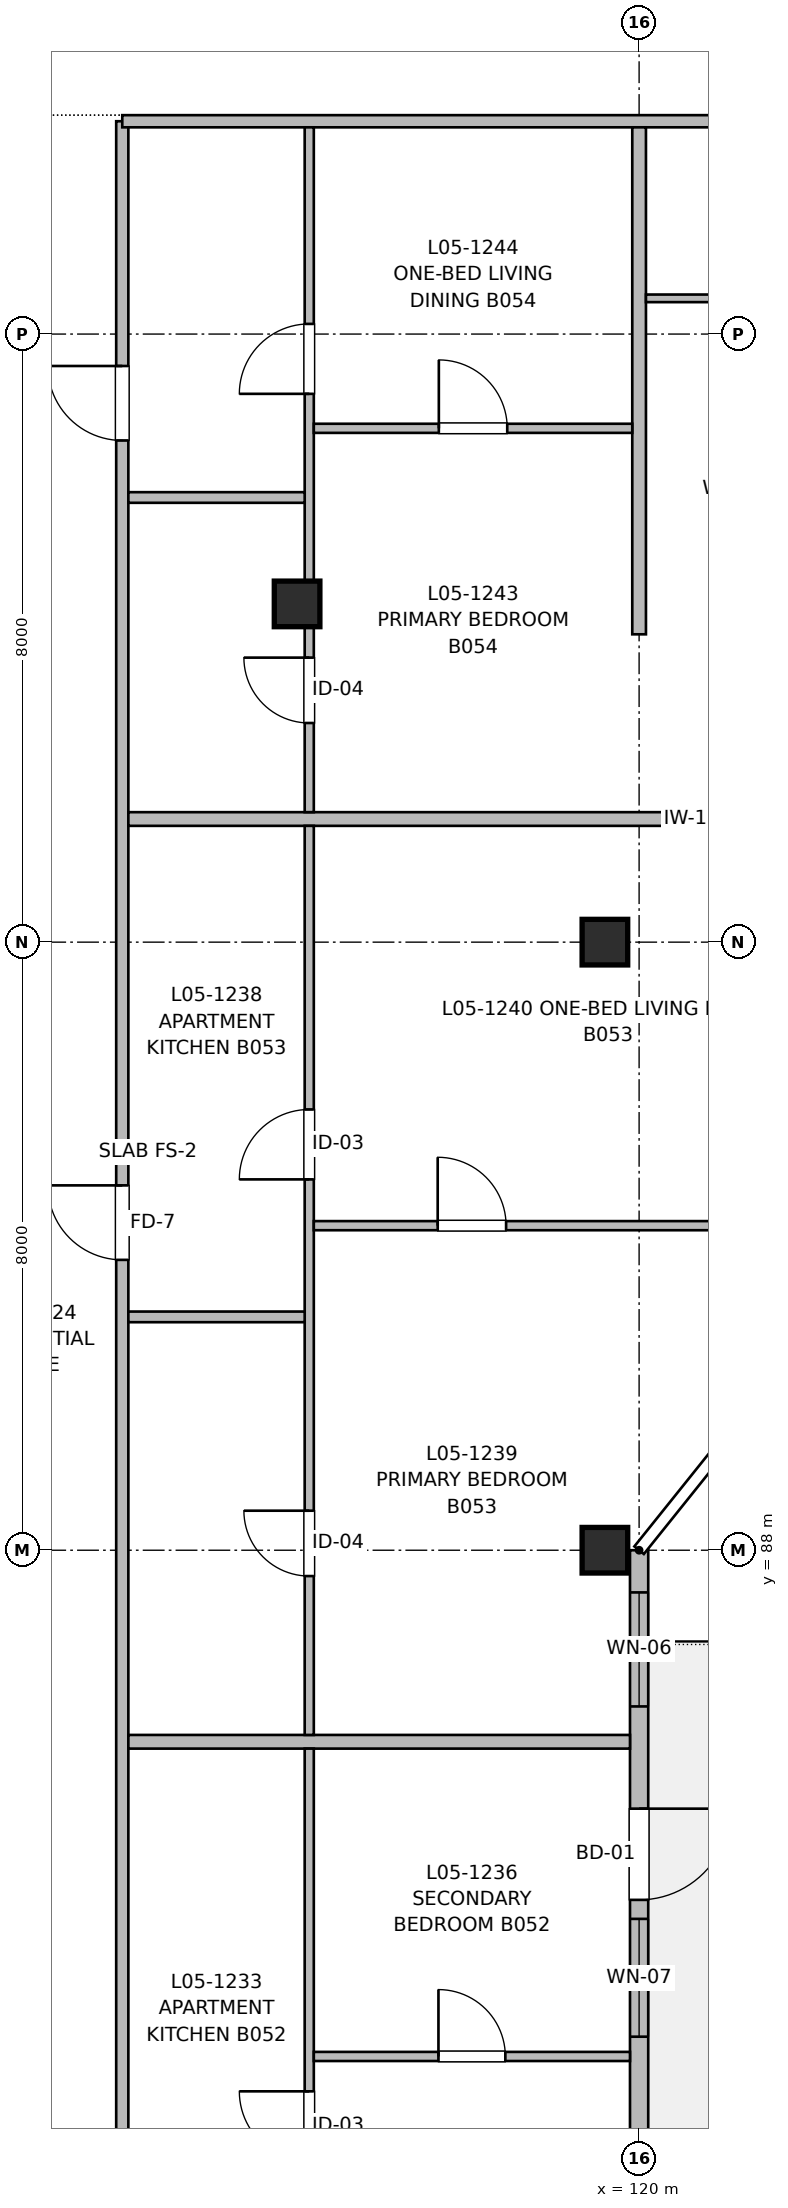
"""IFC4 building model, lengths in metres.
Left out: names, types, materials, properties, quantities, classifications, styles, units other than length and angle.
Written with IfcOpenShell. Run it as: python <this file> out.ifc"""

import sys

from ifc_helpers import new_model, si_unit, direction, frame, frame_2d, origin, origin_2d, place, context, subcontext, project, spatial, rectangle, extrude, element, fill, save


model = new_model("IFC4")
c1 = context("Model", 3, precision=1e-05, world=origin(), true_north=direction((0.0, 1.0)))
c2 = subcontext(c1, "Body", "Model", "MODEL_VIEW")
j1 = project(units=[si_unit("LENGTHUNIT", "METRE"), si_unit("PLANEANGLEUNIT", "RADIAN")], contexts=[c1])
p1 = place(None, origin())
s1 = spatial("IfcSite", under=j1, at=p1, CompositionType="ELEMENT")
p2 = place(p1, origin())
s2 = spatial("IfcBuilding", under=s1, at=p2, CompositionType="ELEMENT")
p3 = place(p2, frame((0.0, 0.0, 16.96)))
s3 = spatial("IfcBuildingStorey", under=s2, at=p3, CompositionType="ELEMENT", Elevation=16.96)
for number, where, z_axis, x_axis in (
    (1, (115.5, 100.45, 0.0), (0.0, 0.0, 1.0), (1.0, 0.0, 0.0)),
    (2, (119.55, 88.0, 0.0), (0.0, 0.0, 1.0), (1.0, 0.0, 0.0)),
    (3, (119.55, 96.0, 0.0), (0.0, 0.0, 1.0), (1.0, 0.0, 0.0)),
):
    element("IfcColumn", number, at=place(p3, frame(where, z_axis=z_axis, x_axis=x_axis)), inside=s3, PredefinedType="COLUMN", context=c2, shape_type="SweptSolid", body=[
        extrude(rectangle(XDim=0.6, YDim=0.6, at=origin_2d()), origin(), (0.0, 0.0, 1.0), 3.2),
    ])
p4 = place(p3, frame((120.0, 88.0, 0.0), z_axis=(0.0, 0.0, 1.0), x_axis=(0.0, -1.0, 0.0)))
e4 = element("IfcWall", 4, at=p4, inside=s3, PredefinedType="SOLIDWALL", context=c2, shape_type="SweptSolid", body=[
    extrude(rectangle(XDim=32.0, YDim=0.24, at=frame_2d((16.0, 0.0))), origin(), (0.0, 0.0, 1.0), 2.98),
])
p5 = place(p4, frame((3.4, 0.0, 0.0)))
e5 = element("IfcOpeningElement", 5, at=p5, cuts=e4, PredefinedType="OPENING", context=c2, shape_type="SweptSolid", body=[
    extrude(rectangle(XDim=1.2, YDim=2.2, at=frame_2d((0.6, 1.1))), frame((0.0, 0.13, 0.0), z_axis=(0.0, -1.0, 0.0), x_axis=(1.0, 0.0, 0.0)), (0.0, 0.0, 1.0), 0.26),
])
p6 = place(p4, frame((4.85, 0.0, 0.82)))
e6 = element("IfcOpeningElement", 6, at=p6, cuts=e4, PredefinedType="OPENING", context=c2, shape_type="SweptSolid", body=[
    extrude(rectangle(XDim=1.55, YDim=1.4, at=frame_2d((0.775, 0.7))), frame((0.0, 0.13, 0.0), z_axis=(0.0, -1.0, 0.0), x_axis=(1.0, 0.0, 0.0)), (0.0, 0.0, 1.0), 0.26),
])
p7 = place(p4, frame((9.4, 0.0, 0.67)))
e7 = element("IfcOpeningElement", 7, at=p7, cuts=e4, PredefinedType="OPENING", context=c2, shape_type="SweptSolid", body=[
    extrude(rectangle(XDim=2.6, YDim=1.55, at=frame_2d((1.3, 0.775))), frame((0.0, 0.13, 0.0), z_axis=(0.0, -1.0, 0.0), x_axis=(1.0, 0.0, 0.0)), (0.0, 0.0, 1.0), 0.26),
])
p8 = place(p4, frame((19.16, 0.0, 0.72)))
e8 = element("IfcOpeningElement", 8, at=p8, cuts=e4, PredefinedType="OPENING", context=c2, shape_type="SweptSolid", body=[
    extrude(rectangle(XDim=1.68, YDim=1.5, at=frame_2d((0.84, 0.75))), frame((0.0, 0.13, 0.0), z_axis=(0.0, -1.0, 0.0), x_axis=(1.0, 0.0, 0.0)), (0.0, 0.0, 1.0), 0.26),
])
p9 = place(p4, frame((27.55, 0.0, 0.72)))
e9 = element("IfcOpeningElement", 9, at=p9, cuts=e4, PredefinedType="OPENING", context=c2, shape_type="SweptSolid", body=[
    extrude(rectangle(XDim=1.8, YDim=1.5, at=frame_2d((0.9, 0.75))), frame((0.0, 0.13, 0.0), z_axis=(0.0, -1.0, 0.0), x_axis=(1.0, 0.0, 0.0)), (0.0, 0.0, 1.0), 0.26),
])
p10 = place(p4, frame((24.425, 0.0, 0.82)))
e10 = element("IfcOpeningElement", 10, at=p10, cuts=e4, PredefinedType="OPENING", context=c2, shape_type="SweptSolid", body=[
    extrude(rectangle(XDim=1.5, YDim=1.4, at=frame_2d((0.75, 0.7))), frame((0.0, 0.13, 0.0), z_axis=(0.0, -1.0, 0.0), x_axis=(1.0, 0.0, 0.0)), (0.0, 0.0, 1.0), 0.26),
])
p11 = place(p4, frame((13.69, 0.0, 0.82)))
e11 = element("IfcOpeningElement", 11, at=p11, cuts=e4, PredefinedType="OPENING", context=c2, shape_type="SweptSolid", body=[
    extrude(rectangle(XDim=1.5, YDim=1.4, at=frame_2d((0.75, 0.7))), frame((0.0, 0.13, 0.0), z_axis=(0.0, -1.0, 0.0), x_axis=(1.0, 0.0, 0.0)), (0.0, 0.0, 1.0), 0.26),
])
p12 = place(p4, frame((0.555, 0.0, 0.82)))
e12 = element("IfcOpeningElement", 12, at=p12, cuts=e4, PredefinedType="OPENING", context=c2, shape_type="SweptSolid", body=[
    extrude(rectangle(XDim=1.5, YDim=1.4, at=frame_2d((0.75, 0.7))), frame((0.0, 0.13, 0.0), z_axis=(0.0, -1.0, 0.0), x_axis=(1.0, 0.0, 0.0)), (0.0, 0.0, 1.0), 0.26),
])
p13 = place(p3, frame((113.2, 56.16, 0.0), z_axis=(0.0, 0.0, 1.0), x_axis=(0.0, 1.0, 0.0)))
e13 = element("IfcWall", 13, at=p13, inside=s3, PredefinedType="PARTITIONING", context=c2, shape_type="SweptSolid", body=[
    extrude(rectangle(XDim=50.64, YDim=0.16, at=frame_2d((25.32, 0.0))), origin(), (0.0, 0.0, 1.0), 2.935),
])
p14 = place(p13, frame((7.69, 0.0, 0.0)))
e14 = element("IfcOpeningElement", 14, at=p14, cuts=e13, PredefinedType="OPENING", context=c2, shape_type="SweptSolid", body=[
    extrude(rectangle(XDim=0.98, YDim=2.15, at=frame_2d((0.49, 1.075))), frame((0.0, 0.09, 0.0), z_axis=(0.0, -1.0, 0.0), x_axis=(1.0, 0.0, 0.0)), (0.0, 0.0, 1.0), 0.18),
])
p15 = place(p13, frame((22.44, 0.0, 0.0)))
e15 = element("IfcOpeningElement", 15, at=p15, cuts=e13, PredefinedType="OPENING", context=c2, shape_type="SweptSolid", body=[
    extrude(rectangle(XDim=1.02, YDim=2.15, at=frame_2d((0.51, 1.075))), frame((0.0, 0.09, 0.0), z_axis=(0.0, -1.0, 0.0), x_axis=(1.0, 0.0, 0.0)), (0.0, 0.0, 1.0), 0.18),
])
p16 = place(p13, frame((35.66, 0.0, 0.0)))
e16 = element("IfcOpeningElement", 16, at=p16, cuts=e13, PredefinedType="OPENING", context=c2, shape_type="SweptSolid", body=[
    extrude(rectangle(XDim=0.98, YDim=2.15, at=frame_2d((0.49, 1.075))), frame((0.0, 0.09, 0.0), z_axis=(0.0, -1.0, 0.0), x_axis=(1.0, 0.0, 0.0)), (0.0, 0.0, 1.0), 0.18),
])
p17 = place(p13, frame((46.44, 0.0, 0.0)))
e17 = element("IfcOpeningElement", 17, at=p17, cuts=e13, PredefinedType="OPENING", context=c2, shape_type="SweptSolid", body=[
    extrude(rectangle(XDim=0.98, YDim=2.15, at=frame_2d((0.49, 1.075))), frame((0.0, 0.09, 0.0), z_axis=(0.0, -1.0, 0.0), x_axis=(1.0, 0.0, 0.0)), (0.0, 0.0, 1.0), 0.18),
])
p18 = place(p3, frame((113.2, 106.8, 0.0), z_axis=(0.0, 0.0, 1.0), x_axis=(1.0, 0.0, 0.0)))
e18 = element("IfcWall", 18, at=p18, inside=s3, PredefinedType="PARTITIONING", context=c2, shape_type="SweptSolid", body=[
    extrude(rectangle(XDim=24.14, YDim=0.16, at=frame_2d((12.07, 0.0))), origin(), (0.0, 0.0, 1.0), 2.935),
])
p19 = place(p18, frame((19.575, 0.0, 0.0)))
e19 = element("IfcOpeningElement", 19, at=p19, cuts=e18, PredefinedType="OPENING", context=c2, shape_type="SweptSolid", body=[
    extrude(rectangle(XDim=1.05, YDim=2.15, at=frame_2d((0.525, 1.075))), frame((0.0, 0.09, 0.0), z_axis=(0.0, -1.0, 0.0), x_axis=(1.0, 0.0, 0.0)), (0.0, 0.0, 1.0), 0.18),
])
p20 = place(p18, frame((8.995, 0.0, 0.0)))
e20 = element("IfcOpeningElement", 20, at=p20, cuts=e18, PredefinedType="OPENING", context=c2, shape_type="SweptSolid", body=[
    extrude(rectangle(XDim=0.98, YDim=2.15, at=frame_2d((0.49, 1.075))), frame((0.0, 0.09, 0.0), z_axis=(0.0, -1.0, 0.0), x_axis=(1.0, 0.0, 0.0)), (0.0, 0.0, 1.0), 0.18),
])
p21 = place(p3, frame((120.0, 100.05, 0.0), z_axis=(0.0, 0.0, 1.0), x_axis=(0.0, 1.0, 0.0)))
e21 = element("IfcWall", 21, at=p21, inside=s3, PredefinedType="PARTITIONING", context=c2, shape_type="SweptSolid", body=[
    extrude(rectangle(XDim=6.67, YDim=0.18, at=frame_2d((3.335, 0.0))), origin(), (0.0, 0.0, 1.0), 2.935),
])
p22 = place(p3, frame((113.28, 85.48, 0.0), z_axis=(0.0, 0.0, 1.0), x_axis=(1.0, 0.0, 0.0)))
e22 = element("IfcWall", 22, at=p22, inside=s3, PredefinedType="PARTITIONING", context=c2, shape_type="SweptSolid", body=[
    extrude(rectangle(XDim=6.6, YDim=0.18, at=frame_2d((3.3, 0.0))), origin(), (0.0, 0.0, 1.0), 2.935),
])
p23 = place(p3, frame((113.28, 97.62, 0.0), z_axis=(0.0, 0.0, 1.0), x_axis=(1.0, 0.0, 0.0)))
e23 = element("IfcWall", 23, at=p23, inside=s3, PredefinedType="PARTITIONING", context=c2, shape_type="SweptSolid", body=[
    extrude(rectangle(XDim=15.689, YDim=0.18, at=frame_2d((7.845, 0.0))), origin(), (0.0, 0.0, 1.0), 2.935),
])
p24 = place(p3, frame((115.66, 71.42, 0.0), z_axis=(0.0, 0.0, 1.0), x_axis=(0.0, 1.0, 0.0)))
e24 = element("IfcWall", 24, at=p24, inside=s3, PredefinedType="PARTITIONING", context=c2, shape_type="SweptSolid", body=[
    extrude(rectangle(XDim=13.97, YDim=0.12, at=frame_2d((6.985, 0.0))), origin(), (0.0, 0.0, 1.0), 2.935),
])
p25 = place(p24, frame((2.443, 0.0, 0.0)))
e25 = element("IfcOpeningElement", 25, at=p25, cuts=e24, PredefinedType="OPENING", context=c2, shape_type="SweptSolid", body=[
    extrude(rectangle(XDim=0.94, YDim=2.1, at=frame_2d((0.47, 1.05))), frame((0.0, 0.07, 0.0), z_axis=(0.0, -1.0, 0.0), x_axis=(1.0, 0.0, 0.0)), (0.0, 0.0, 1.0), 0.14),
])
p26 = place(p24, frame((8.541, 0.0, 0.0)))
e26 = element("IfcOpeningElement", 26, at=p26, cuts=e24, PredefinedType="OPENING", context=c2, shape_type="SweptSolid", body=[
    extrude(rectangle(XDim=0.92, YDim=2.1, at=frame_2d((0.46, 1.05))), frame((0.0, 0.07, 0.0), z_axis=(0.0, -1.0, 0.0), x_axis=(1.0, 0.0, 0.0)), (0.0, 0.0, 1.0), 0.14),
])
p27 = place(p3, frame((115.72, 81.34, 0.0), z_axis=(0.0, 0.0, 1.0), x_axis=(1.0, 0.0, 0.0)))
e27 = element("IfcWall", 27, at=p27, inside=s3, PredefinedType="PARTITIONING", context=c2, shape_type="SweptSolid", body=[
    extrude(rectangle(XDim=4.16, YDim=0.12, at=frame_2d((2.08, 0.0))), origin(), (0.0, 0.0, 1.0), 2.935),
])
p28 = place(p27, frame((1.64, 0.0, 0.0)))
e28 = element("IfcOpeningElement", 28, at=p28, cuts=e27, PredefinedType="OPENING", context=c2, shape_type="SweptSolid", body=[
    extrude(rectangle(XDim=0.88, YDim=2.1, at=frame_2d((0.44, 1.05))), frame((0.0, 0.07, 0.0), z_axis=(0.0, -1.0, 0.0), x_axis=(1.0, 0.0, 0.0)), (0.0, 0.0, 1.0), 0.14),
])
p29 = place(p3, frame((115.66, 85.57, 0.0), z_axis=(0.0, 0.0, 1.0), x_axis=(0.0, 1.0, 0.0)))
e29 = element("IfcWall", 29, at=p29, inside=s3, PredefinedType="PARTITIONING", context=c2, shape_type="SweptSolid", body=[
    extrude(rectangle(XDim=11.96, YDim=0.12, at=frame_2d((5.98, 0.0))), origin(), (0.0, 0.0, 1.0), 2.935),
])
p30 = place(p29, frame((2.09, 0.0, 0.0)))
e30 = element("IfcOpeningElement", 30, at=p30, cuts=e29, PredefinedType="OPENING", context=c2, shape_type="SweptSolid", body=[
    extrude(rectangle(XDim=0.86, YDim=2.1, at=frame_2d((0.43, 1.05))), frame((0.0, 0.07, 0.0), z_axis=(0.0, -1.0, 0.0), x_axis=(1.0, 0.0, 0.0)), (0.0, 0.0, 1.0), 0.14),
])
p31 = place(p29, frame((7.309, 0.0, 0.0)))
e31 = element("IfcOpeningElement", 31, at=p31, cuts=e29, PredefinedType="OPENING", context=c2, shape_type="SweptSolid", body=[
    extrude(rectangle(XDim=0.92, YDim=2.1, at=frame_2d((0.46, 1.05))), frame((0.0, 0.07, 0.0), z_axis=(0.0, -1.0, 0.0), x_axis=(1.0, 0.0, 0.0)), (0.0, 0.0, 1.0), 0.14),
])
p32 = place(p3, frame((113.28, 91.07, 0.0), z_axis=(0.0, 0.0, 1.0), x_axis=(1.0, 0.0, 0.0)))
e32 = element("IfcWall", 32, at=p32, inside=s3, PredefinedType="PARTITIONING", context=c2, shape_type="SweptSolid", body=[
    extrude(rectangle(XDim=2.32, YDim=0.14, at=frame_2d((1.16, 0.0))), origin(), (0.0, 0.0, 1.0), 2.935),
])
p33 = place(p3, frame((115.72, 92.27, 0.0), z_axis=(0.0, 0.0, 1.0), x_axis=(1.0, 0.0, 0.0)))
e33 = element("IfcWall", 33, at=p33, inside=s3, PredefinedType="PARTITIONING", context=c2, shape_type="SweptSolid", body=[
    extrude(rectangle(XDim=7.655, YDim=0.12, at=frame_2d((3.827, 0.0))), origin(), (0.0, 0.0, 1.0), 2.935),
])
p34 = place(p33, frame((1.63, 0.0, 0.0)))
e34 = element("IfcOpeningElement", 34, at=p34, cuts=e33, PredefinedType="OPENING", context=c2, shape_type="SweptSolid", body=[
    extrude(rectangle(XDim=0.9, YDim=2.1, at=frame_2d((0.45, 1.05))), frame((0.0, 0.07, 0.0), z_axis=(0.0, -1.0, 0.0), x_axis=(1.0, 0.0, 0.0)), (0.0, 0.0, 1.0), 0.14),
])
p35 = place(p3, frame((115.66, 97.71, 0.0), z_axis=(0.0, 0.0, 1.0), x_axis=(0.0, 1.0, 0.0)))
e35 = element("IfcWall", 35, at=p35, inside=s3, PredefinedType="PARTITIONING", context=c2, shape_type="SweptSolid", body=[
    extrude(rectangle(XDim=9.01, YDim=0.12, at=frame_2d((4.505, 0.0))), origin(), (0.0, 0.0, 1.0), 2.68),
])
p36 = place(p35, frame((1.173, 0.0, 0.0)))
e36 = element("IfcOpeningElement", 36, at=p36, cuts=e35, PredefinedType="OPENING", context=c2, shape_type="SweptSolid", body=[
    extrude(rectangle(XDim=0.86, YDim=2.1, at=frame_2d((0.43, 1.05))), frame((0.0, 0.07, 0.0), z_axis=(0.0, -1.0, 0.0), x_axis=(1.0, 0.0, 0.0)), (0.0, 0.0, 1.0), 0.14),
])
p37 = place(p35, frame((5.504, 0.0, 0.0)))
e37 = element("IfcOpeningElement", 37, at=p37, cuts=e35, PredefinedType="OPENING", context=c2, shape_type="SweptSolid", body=[
    extrude(rectangle(XDim=0.92, YDim=2.1, at=frame_2d((0.46, 1.05))), frame((0.0, 0.07, 0.0), z_axis=(0.0, -1.0, 0.0), x_axis=(1.0, 0.0, 0.0)), (0.0, 0.0, 1.0), 0.14),
])
p38 = place(p3, frame((113.28, 101.85, 0.0), z_axis=(0.0, 0.0, 1.0), x_axis=(1.0, 0.0, 0.0)))
e38 = element("IfcWall", 38, at=p38, inside=s3, PredefinedType="PARTITIONING", context=c2, shape_type="SweptSolid", body=[
    extrude(rectangle(XDim=2.32, YDim=0.14, at=frame_2d((1.16, 0.0))), origin(), (0.0, 0.0, 1.0), 2.935),
])
p39 = place(p3, frame((115.72, 102.76, 0.0), z_axis=(0.0, 0.0, 1.0), x_axis=(1.0, 0.0, 0.0)))
e39 = element("IfcWall", 39, at=p39, inside=s3, PredefinedType="PARTITIONING", context=c2, shape_type="SweptSolid", body=[
    extrude(rectangle(XDim=4.19, YDim=0.12, at=frame_2d((2.095, 0.0))), origin(), (0.0, 0.0, 1.0), 2.935),
])
p40 = place(p39, frame((1.645, 0.0, 0.0)))
e40 = element("IfcOpeningElement", 40, at=p40, cuts=e39, PredefinedType="OPENING", context=c2, shape_type="SweptSolid", body=[
    extrude(rectangle(XDim=0.9, YDim=2.1, at=frame_2d((0.45, 1.05))), frame((0.0, 0.07, 0.0), z_axis=(0.0, -1.0, 0.0), x_axis=(1.0, 0.0, 0.0)), (0.0, 0.0, 1.0), 0.14),
])
p41 = place(p3, frame((120.09, 104.47, 0.0), z_axis=(0.0, 0.0, 1.0), x_axis=(1.0, 0.0, 0.0)))
e41 = element("IfcWall", 41, at=p41, inside=s3, PredefinedType="PARTITIONING", context=c2, shape_type="SweptSolid", body=[
    extrude(rectangle(XDim=5.13, YDim=0.1, at=frame_2d((2.565, 0.0))), origin(), (0.0, 0.0, 1.0), 2.935),
])
p42 = place(p41, frame((2.18, 0.0, 0.0)))
e42 = element("IfcOpeningElement", 42, at=p42, cuts=e41, PredefinedType="OPENING", context=c2, shape_type="SweptSolid", body=[
    extrude(rectangle(XDim=0.92, YDim=2.1, at=frame_2d((0.46, 1.05))), frame((0.0, 0.06, 0.0), z_axis=(0.0, -1.0, 0.0), x_axis=(1.0, 0.0, 0.0)), (0.0, 0.0, 1.0), 0.12),
])
p43 = place(p5, origin())
e43 = element("IfcDoor", 43, at=p43, inside=s3, OperationType="SINGLE_SWING_LEFT", PredefinedType="DOOR", context=c2, shape_type="SweptSolid", body=[
    extrude(rectangle(XDim=1.2, YDim=2.2, at=frame_2d((0.6, 1.1))), frame((0.0, 0.025, 0.0), z_axis=(0.0, -1.0, 0.0), x_axis=(1.0, 0.0, 0.0)), (0.0, 0.0, 1.0), 0.05),
])
fill(e5, e43)
p44 = place(p6, origin())
e44 = element("IfcWindow", 44, at=p44, inside=s3, PartitioningType="SINGLE_PANEL", PredefinedType="WINDOW", context=c2, shape_type="SweptSolid", body=[
    extrude(rectangle(XDim=1.55, YDim=1.4, at=frame_2d((0.775, 0.7))), frame((0.0, 0.03, 0.0), z_axis=(0.0, -1.0, 0.0), x_axis=(1.0, 0.0, 0.0)), (0.0, 0.0, 1.0), 0.06),
])
fill(e6, e44)
p45 = place(p26, origin())
e45 = element("IfcDoor", 45, at=p45, inside=s3, OperationType="SINGLE_SWING_RIGHT", PredefinedType="DOOR", context=c2, shape_type="SweptSolid", body=[
    extrude(rectangle(XDim=0.92, YDim=2.1, at=frame_2d((0.46, 1.05))), frame((0.0, 0.025, 0.0), z_axis=(0.0, -1.0, 0.0), x_axis=(1.0, 0.0, 0.0)), (0.0, 0.0, 1.0), 0.05),
])
fill(e26, e45)
p46 = place(p28, origin())
e46 = element("IfcDoor", 46, at=p46, inside=s3, OperationType="SINGLE_SWING_LEFT", PredefinedType="DOOR", context=c2, shape_type="SweptSolid", body=[
    extrude(rectangle(XDim=0.88, YDim=2.1, at=frame_2d((0.44, 1.05))), frame((0.0, 0.025, 0.0), z_axis=(0.0, -1.0, 0.0), x_axis=(1.0, 0.0, 0.0)), (0.0, 0.0, 1.0), 0.05),
])
fill(e28, e46)
p47 = place(p30, origin())
e47 = element("IfcDoor", 47, at=p47, inside=s3, OperationType="SINGLE_SWING_RIGHT", PredefinedType="DOOR", context=c2, shape_type="SweptSolid", body=[
    extrude(rectangle(XDim=0.86, YDim=2.1, at=frame_2d((0.43, 1.05))), frame((0.0, 0.025, 0.0), z_axis=(0.0, -1.0, 0.0), x_axis=(1.0, 0.0, 0.0)), (0.0, 0.0, 1.0), 0.05),
])
fill(e30, e47)
p48 = place(p31, origin())
e48 = element("IfcDoor", 48, at=p48, inside=s3, OperationType="SINGLE_SWING_LEFT", PredefinedType="DOOR", context=c2, shape_type="SweptSolid", body=[
    extrude(rectangle(XDim=0.92, YDim=2.1, at=frame_2d((0.46, 1.05))), frame((0.0, 0.025, 0.0), z_axis=(0.0, -1.0, 0.0), x_axis=(1.0, 0.0, 0.0)), (0.0, 0.0, 1.0), 0.05),
])
fill(e31, e48)
p49 = place(p16, origin())
e49 = element("IfcDoor", 49, at=p49, inside=s3, OperationType="SINGLE_SWING_RIGHT", PredefinedType="DOOR", context=c2, shape_type="SweptSolid", body=[
    extrude(rectangle(XDim=0.98, YDim=2.15, at=frame_2d((0.49, 1.075))), frame((0.0, 0.025, 0.0), z_axis=(0.0, -1.0, 0.0), x_axis=(1.0, 0.0, 0.0)), (0.0, 0.0, 1.0), 0.05),
])
fill(e16, e49)
p50 = place(p34, origin())
e50 = element("IfcDoor", 50, at=p50, inside=s3, OperationType="SINGLE_SWING_LEFT", PredefinedType="DOOR", context=c2, shape_type="SweptSolid", body=[
    extrude(rectangle(XDim=0.9, YDim=2.1, at=frame_2d((0.45, 1.05))), frame((0.0, 0.025, 0.0), z_axis=(0.0, -1.0, 0.0), x_axis=(1.0, 0.0, 0.0)), (0.0, 0.0, 1.0), 0.05),
])
fill(e34, e50)
p51 = place(p36, origin())
e51 = element("IfcDoor", 51, at=p51, inside=s3, OperationType="SINGLE_SWING_RIGHT", PredefinedType="DOOR", context=c2, shape_type="SweptSolid", body=[
    extrude(rectangle(XDim=0.86, YDim=2.1, at=frame_2d((0.43, 1.05))), frame((0.0, 0.025, 0.0), z_axis=(0.0, -1.0, 0.0), x_axis=(1.0, 0.0, 0.0)), (0.0, 0.0, 1.0), 0.05),
])
fill(e36, e51)
p52 = place(p37, origin())
e52 = element("IfcDoor", 52, at=p52, inside=s3, OperationType="SINGLE_SWING_LEFT", PredefinedType="DOOR", context=c2, shape_type="SweptSolid", body=[
    extrude(rectangle(XDim=0.92, YDim=2.1, at=frame_2d((0.46, 1.05))), frame((0.0, 0.025, 0.0), z_axis=(0.0, -1.0, 0.0), x_axis=(1.0, 0.0, 0.0)), (0.0, 0.0, 1.0), 0.05),
])
fill(e37, e52)
p53 = place(p17, origin())
e53 = element("IfcDoor", 53, at=p53, inside=s3, OperationType="SINGLE_SWING_RIGHT", PredefinedType="DOOR", context=c2, shape_type="SweptSolid", body=[
    extrude(rectangle(XDim=0.98, YDim=2.15, at=frame_2d((0.49, 1.075))), frame((0.0, 0.025, 0.0), z_axis=(0.0, -1.0, 0.0), x_axis=(1.0, 0.0, 0.0)), (0.0, 0.0, 1.0), 0.05),
])
fill(e17, e53)
p54 = place(p40, origin())
e54 = element("IfcDoor", 54, at=p54, inside=s3, OperationType="SINGLE_SWING_LEFT", PredefinedType="DOOR", context=c2, shape_type="SweptSolid", body=[
    extrude(rectangle(XDim=0.9, YDim=2.1, at=frame_2d((0.45, 1.05))), frame((0.0, 0.025, 0.0), z_axis=(0.0, -1.0, 0.0), x_axis=(1.0, 0.0, 0.0)), (0.0, 0.0, 1.0), 0.05),
])
fill(e40, e54)
p55 = place(p12, origin())
e55 = element("IfcWindow", 55, at=p55, inside=s3, PartitioningType="SINGLE_PANEL", PredefinedType="WINDOW", context=c2, shape_type="SweptSolid", body=[
    extrude(rectangle(XDim=1.5, YDim=1.4, at=frame_2d((0.75, 0.7))), frame((0.0, 0.03, 0.0), z_axis=(0.0, -1.0, 0.0), x_axis=(1.0, 0.0, 0.0)), (0.0, 0.0, 1.0), 0.06),
])
fill(e12, e55)
save(model, sys.argv[1])
